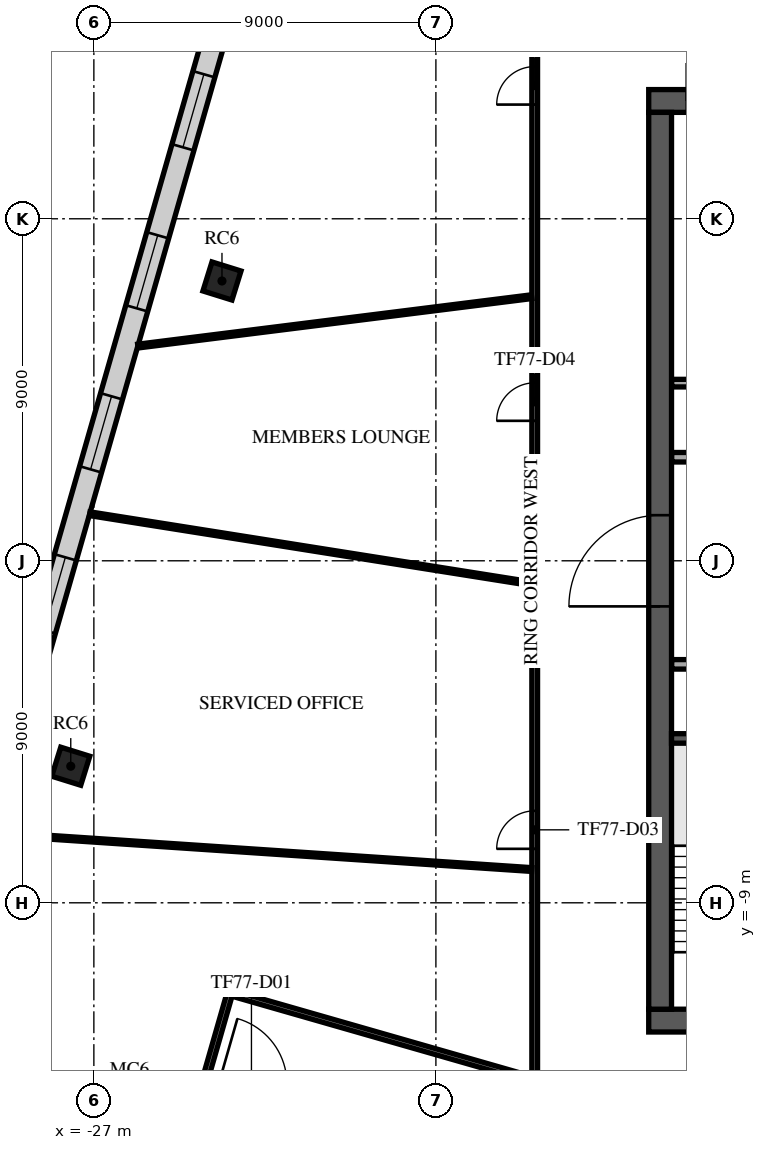
"""IFC4 building model, lengths in metres.
Left out: names, types, materials, properties, quantities, classifications, styles, units other than length and angle.
Written with IfcOpenShell. Run it as: python <this file> out.ifc"""

import sys

from ifc_helpers import new_model, si_unit, direction, frame, frame_2d, origin, origin_2d, place, context, subcontext, project, spatial, rectangle, extrude, element, fill, save


model = new_model("IFC4")
c1 = context("Model", 3, precision=1e-05, world=origin(), true_north=direction((0.0, 1.0)))
c2 = subcontext(c1, "Body", "Model", "MODEL_VIEW")
j1 = project(units=[si_unit("LENGTHUNIT", "METRE"), si_unit("PLANEANGLEUNIT", "RADIAN")], contexts=[c1])
p1 = place(None, origin())
s1 = spatial("IfcSite", under=j1, at=p1, CompositionType="ELEMENT")
p2 = place(p1, origin())
s2 = spatial("IfcBuilding", under=s1, at=p2, CompositionType="ELEMENT")
p3 = place(p2, frame((0.0, 0.0, 324.5)))
s3 = spatial("IfcBuildingStorey", under=s2, at=p3, CompositionType="ELEMENT", Elevation=324.5)
for number, where, z_axis, x_axis in (
    (1, (-23.629, 7.363, 0.0), (0.0, 0.0, 1.0), (0.298, 0.955, 0.0)),
    (2, (-27.608, -5.406, 0.0), (0.0, 0.0, 1.0), (0.298, 0.955, 0.0)),
):
    element("IfcColumn", number, at=place(p3, frame(where, z_axis=z_axis, x_axis=x_axis)), inside=s3, PredefinedType="COLUMN", context=c2, shape_type="SweptSolid", body=[
        extrude(rectangle(XDim=0.8, YDim=0.8, at=origin_2d()), origin(), (0.0, 0.0, 1.0), 4.0),
    ])
p4 = place(p3, frame((-12.4, 12.1, 0.0), z_axis=(0.0, 0.0, 1.0), x_axis=(1.0, 0.0, 0.0)))
e3 = element("IfcWall", 3, at=p4, inside=s3, PredefinedType="SHEAR", context=c2, shape_type="SweptSolid", body=[
    extrude(rectangle(XDim=24.8, YDim=0.6, at=frame_2d((12.4, 0.0))), origin(), (0.0, 0.0, 1.0), 3.65),
])
p5 = place(p4, frame((11.2, 0.0, 0.0)))
e4 = element("IfcOpeningElement", 4, at=p5, cuts=e3, PredefinedType="OPENING", context=c2, shape_type="SweptSolid", body=[
    extrude(rectangle(XDim=2.4, YDim=2.4, at=frame_2d((1.2, 1.2))), frame((0.0, 0.31, 0.0), z_axis=(0.0, -1.0, 0.0), x_axis=(1.0, 0.0, 0.0)), (0.0, 0.0, 1.0), 0.62),
])
p6 = place(p4, frame((22.025, 0.0, 0.0)))
e5 = element("IfcOpeningElement", 5, at=p6, cuts=e3, PredefinedType="OPENING", context=c2, shape_type="SweptSolid", body=[
    extrude(rectangle(XDim=1.2, YDim=2.1, at=frame_2d((0.6, 1.05))), frame((0.0, 0.31, 0.0), z_axis=(0.0, -1.0, 0.0), x_axis=(1.0, 0.0, 0.0)), (0.0, 0.0, 1.0), 0.62),
])
p7 = place(p4, frame((1.0, 0.0, 0.0)))
e6 = element("IfcOpeningElement", 6, at=p7, cuts=e3, PredefinedType="OPENING", context=c2, shape_type="SweptSolid", body=[
    extrude(rectangle(XDim=1.0, YDim=2.1, at=frame_2d((0.5, 1.05))), frame((0.0, 0.31, 0.0), z_axis=(0.0, -1.0, 0.0), x_axis=(1.0, 0.0, 0.0)), (0.0, 0.0, 1.0), 0.62),
])
p8 = place(p3, frame((-12.4, -12.1, 0.0), z_axis=(0.0, 0.0, 1.0), x_axis=(1.0, 0.0, 0.0)))
e7 = element("IfcWall", 7, at=p8, inside=s3, PredefinedType="SHEAR", context=c2, shape_type="SweptSolid", body=[
    extrude(rectangle(XDim=24.8, YDim=0.6, at=frame_2d((12.4, 0.0))), origin(), (0.0, 0.0, 1.0), 3.65),
])
p9 = place(p8, frame((7.3, 0.0, 0.0)))
e8 = element("IfcOpeningElement", 8, at=p9, cuts=e7, PredefinedType="OPENING", context=c2, shape_type="SweptSolid", body=[
    extrude(rectangle(XDim=2.0, YDim=2.1, at=frame_2d((1.0, 1.05))), frame((0.0, 0.31, 0.0), z_axis=(0.0, -1.0, 0.0), x_axis=(1.0, 0.0, 0.0)), (0.0, 0.0, 1.0), 0.62),
])
p10 = place(p8, frame((17.425, 0.0, 0.0)))
e9 = element("IfcOpeningElement", 9, at=p10, cuts=e7, PredefinedType="OPENING", context=c2, shape_type="SweptSolid", body=[
    extrude(rectangle(XDim=1.2, YDim=2.1, at=frame_2d((0.6, 1.05))), frame((0.0, 0.31, 0.0), z_axis=(0.0, -1.0, 0.0), x_axis=(1.0, 0.0, 0.0)), (0.0, 0.0, 1.0), 0.62),
])
p11 = place(p8, frame((1.575, 0.0, 0.0)))
e10 = element("IfcOpeningElement", 10, at=p11, cuts=e7, PredefinedType="OPENING", context=c2, shape_type="SweptSolid", body=[
    extrude(rectangle(XDim=1.2, YDim=2.1, at=frame_2d((0.6, 1.05))), frame((0.0, 0.31, 0.0), z_axis=(0.0, -1.0, 0.0), x_axis=(1.0, 0.0, 0.0)), (0.0, 0.0, 1.0), 0.62),
])
p12 = place(p8, frame((22.025, 0.0, 0.0)))
e11 = element("IfcOpeningElement", 11, at=p12, cuts=e7, PredefinedType="OPENING", context=c2, shape_type="SweptSolid", body=[
    extrude(rectangle(XDim=1.2, YDim=2.1, at=frame_2d((0.6, 1.05))), frame((0.0, 0.31, 0.0), z_axis=(0.0, -1.0, 0.0), x_axis=(1.0, 0.0, 0.0)), (0.0, 0.0, 1.0), 0.62),
])
p13 = place(p3, frame((-12.1, -11.8, 0.0), z_axis=(0.0, 0.0, 1.0), x_axis=(0.0, 1.0, 0.0)))
e12 = element("IfcWall", 12, at=p13, inside=s3, PredefinedType="SHEAR", context=c2, shape_type="SweptSolid", body=[
    extrude(rectangle(XDim=23.6, YDim=0.6, at=frame_2d((11.8, 0.0))), origin(), (0.0, 0.0, 1.0), 3.65),
])
p14 = place(p13, frame((10.6, 0.0, 0.0)))
e13 = element("IfcOpeningElement", 13, at=p14, cuts=e12, PredefinedType="OPENING", context=c2, shape_type="SweptSolid", body=[
    extrude(rectangle(XDim=2.4, YDim=2.4, at=frame_2d((1.2, 1.2))), frame((0.0, 0.31, 0.0), z_axis=(0.0, -1.0, 0.0), x_axis=(1.0, 0.0, 0.0)), (0.0, 0.0, 1.0), 0.62),
])
p15 = place(p3, frame((-8.65, -4.675, 0.0), z_axis=(0.0, 0.0, 1.0), x_axis=(-1.0, 0.0, 0.0)))
e14 = element("IfcWall", 14, at=p15, inside=s3, PredefinedType="SOLIDWALL", context=c2, shape_type="SweptSolid", body=[
    extrude(rectangle(XDim=3.15, YDim=0.25, at=frame_2d((1.575, 0.0))), origin(), (0.0, 0.0, 1.0), 3.65),
])
p16 = place(p3, frame((-11.795, -2.725, 0.0), z_axis=(0.0, 0.0, 1.0), x_axis=(1.0, 0.0, 0.0)))
e15 = element("IfcWall", 15, at=p16, inside=s3, PredefinedType="PARTITIONING", context=c2, shape_type="SweptSolid", body=[
    extrude(rectangle(XDim=14.415, YDim=0.25, at=frame_2d((7.208, 0.0))), origin(), (0.0, 0.0, 1.0), 3.65),
])
p17 = place(p16, frame((1.295, 0.0, 0.0)))
e16 = element("IfcOpeningElement", 16, at=p17, cuts=e15, PredefinedType="OPENING", context=c2, shape_type="SweptSolid", body=[
    extrude(rectangle(XDim=1.0, YDim=2.1, at=frame_2d((0.5, 1.05))), frame((0.0, 0.135, 0.0), z_axis=(0.0, -1.0, 0.0), x_axis=(1.0, 0.0, 0.0)), (0.0, 0.0, 1.0), 0.27),
])
p18 = place(p16, frame((4.42, 0.0, 0.0)))
e17 = element("IfcOpeningElement", 17, at=p18, cuts=e15, PredefinedType="OPENING", context=c2, shape_type="SweptSolid", body=[
    extrude(rectangle(XDim=1.0, YDim=2.1, at=frame_2d((0.5, 1.05))), frame((0.0, 0.135, 0.0), z_axis=(0.0, -1.0, 0.0), x_axis=(1.0, 0.0, 0.0)), (0.0, 0.0, 1.0), 0.27),
])
p19 = place(p16, frame((9.92, 0.0, 0.0)))
e18 = element("IfcOpeningElement", 18, at=p19, cuts=e15, PredefinedType="OPENING", context=c2, shape_type="SweptSolid", body=[
    extrude(rectangle(XDim=1.0, YDim=2.1, at=frame_2d((0.5, 1.05))), frame((0.0, 0.135, 0.0), z_axis=(0.0, -1.0, 0.0), x_axis=(1.0, 0.0, 0.0)), (0.0, 0.0, 1.0), 0.27),
])
p20 = place(p3, frame((-11.795, 2.725, 0.0), z_axis=(0.0, 0.0, 1.0), x_axis=(1.0, 0.0, 0.0)))
e19 = element("IfcWall", 19, at=p20, inside=s3, PredefinedType="PARTITIONING", context=c2, shape_type="SweptSolid", body=[
    extrude(rectangle(XDim=23.59, YDim=0.25, at=frame_2d((11.795, 0.0))), origin(), (0.0, 0.0, 1.0), 3.65),
])
p21 = place(p20, frame((21.345, 0.0, 0.0)))
e20 = element("IfcOpeningElement", 20, at=p21, cuts=e19, PredefinedType="OPENING", context=c2, shape_type="SweptSolid", body=[
    extrude(rectangle(XDim=0.9, YDim=2.1, at=frame_2d((0.45, 1.05))), frame((0.0, 0.135, 0.0), z_axis=(0.0, -1.0, 0.0), x_axis=(1.0, 0.0, 0.0)), (0.0, 0.0, 1.0), 0.27),
])
p22 = place(p20, frame((1.345, 0.0, 0.0)))
e21 = element("IfcOpeningElement", 21, at=p22, cuts=e19, PredefinedType="OPENING", context=c2, shape_type="SweptSolid", body=[
    extrude(rectangle(XDim=0.9, YDim=2.1, at=frame_2d((0.45, 1.05))), frame((0.0, 0.135, 0.0), z_axis=(0.0, -1.0, 0.0), x_axis=(1.0, 0.0, 0.0)), (0.0, 0.0, 1.0), 0.27),
])
p23 = place(p20, frame((4.32, 0.0, 0.0)))
e22 = element("IfcOpeningElement", 22, at=p23, cuts=e19, PredefinedType="OPENING", context=c2, shape_type="SweptSolid", body=[
    extrude(rectangle(XDim=1.2, YDim=2.1, at=frame_2d((0.6, 1.05))), frame((0.0, 0.135, 0.0), z_axis=(0.0, -1.0, 0.0), x_axis=(1.0, 0.0, 0.0)), (0.0, 0.0, 1.0), 0.27),
])
p24 = place(p20, frame((12.57, 0.0, 0.0)))
e23 = element("IfcOpeningElement", 23, at=p24, cuts=e19, PredefinedType="OPENING", context=c2, shape_type="SweptSolid", body=[
    extrude(rectangle(XDim=1.2, YDim=2.1, at=frame_2d((0.6, 1.05))), frame((0.0, 0.135, 0.0), z_axis=(0.0, -1.0, 0.0), x_axis=(1.0, 0.0, 0.0)), (0.0, 0.0, 1.0), 0.27),
])
p25 = place(p3, frame((-11.795, 4.675, 0.0), z_axis=(0.0, 0.0, 1.0), x_axis=(1.0, 0.0, 0.0)))
e24 = element("IfcWall", 24, at=p25, inside=s3, PredefinedType="PARTITIONING", context=c2, shape_type="SweptSolid", body=[
    extrude(rectangle(XDim=3.645, YDim=0.2, at=frame_2d((1.823, 0.0))), origin(), (0.0, 0.0, 1.0), 3.65),
])
p26 = place(p3, frame((-18.913, 30.91, 0.0), z_axis=(0.0, 0.0, 1.0), x_axis=(-0.275636693765, -0.961261885778, 0.0)))
e25 = element("IfcWall", 25, at=p26, inside=s3, PredefinedType="STANDARD", context=c2, shape_type="SweptSolid", body=[
    extrude(rectangle(XDim=48.49, YDim=0.6, at=frame_2d((24.245, 0.0))), origin(), (0.0, 0.0, 1.0), 3.65),
])
p27 = place(p26, frame((1.204, 0.0, 0.9)))
e26 = element("IfcOpeningElement", 26, at=p27, cuts=e25, PredefinedType="OPENING", context=c2, shape_type="SweptSolid", body=[
    extrude(rectangle(XDim=2.0, YDim=2.1, at=frame_2d((1.0, 1.05))), frame((0.0, 0.31, 0.0), z_axis=(0.0, -1.0, 0.0), x_axis=(1.0, 0.0, 0.0)), (0.0, 0.0, 1.0), 0.62),
])
p28 = place(p26, frame((5.612, 0.0, 0.9)))
e27 = element("IfcOpeningElement", 27, at=p28, cuts=e25, PredefinedType="OPENING", context=c2, shape_type="SweptSolid", body=[
    extrude(rectangle(XDim=2.0, YDim=2.1, at=frame_2d((1.0, 1.05))), frame((0.0, 0.31, 0.0), z_axis=(0.0, -1.0, 0.0), x_axis=(1.0, 0.0, 0.0)), (0.0, 0.0, 1.0), 0.62),
])
p29 = place(p26, frame((10.021, 0.0, 0.9)))
e28 = element("IfcOpeningElement", 28, at=p29, cuts=e25, PredefinedType="OPENING", context=c2, shape_type="SweptSolid", body=[
    extrude(rectangle(XDim=2.0, YDim=2.1, at=frame_2d((1.0, 1.05))), frame((0.0, 0.31, 0.0), z_axis=(0.0, -1.0, 0.0), x_axis=(1.0, 0.0, 0.0)), (0.0, 0.0, 1.0), 0.62),
])
p30 = place(p26, frame((14.428, 0.0, 0.9)))
e29 = element("IfcOpeningElement", 29, at=p30, cuts=e25, PredefinedType="OPENING", context=c2, shape_type="SweptSolid", body=[
    extrude(rectangle(XDim=2.0, YDim=2.1, at=frame_2d((1.0, 1.05))), frame((0.0, 0.31, 0.0), z_axis=(0.0, -1.0, 0.0), x_axis=(1.0, 0.0, 0.0)), (0.0, 0.0, 1.0), 0.62),
])
p31 = place(p26, frame((18.837, 0.0, 0.9)))
e30 = element("IfcOpeningElement", 30, at=p31, cuts=e25, PredefinedType="OPENING", context=c2, shape_type="SweptSolid", body=[
    extrude(rectangle(XDim=2.0, YDim=2.1, at=frame_2d((1.0, 1.05))), frame((0.0, 0.31, 0.0), z_axis=(0.0, -1.0, 0.0), x_axis=(1.0, 0.0, 0.0)), (0.0, 0.0, 1.0), 0.62),
])
p32 = place(p26, frame((23.245, 0.0, 0.9)))
e31 = element("IfcOpeningElement", 31, at=p32, cuts=e25, PredefinedType="OPENING", context=c2, shape_type="SweptSolid", body=[
    extrude(rectangle(XDim=2.0, YDim=2.1, at=frame_2d((1.0, 1.05))), frame((0.0, 0.31, 0.0), z_axis=(0.0, -1.0, 0.0), x_axis=(1.0, 0.0, 0.0)), (0.0, 0.0, 1.0), 0.62),
])
p33 = place(p26, frame((27.653, 0.0, 0.9)))
e32 = element("IfcOpeningElement", 32, at=p33, cuts=e25, PredefinedType="OPENING", context=c2, shape_type="SweptSolid", body=[
    extrude(rectangle(XDim=2.0, YDim=2.1, at=frame_2d((1.0, 1.05))), frame((0.0, 0.31, 0.0), z_axis=(0.0, -1.0, 0.0), x_axis=(1.0, 0.0, 0.0)), (0.0, 0.0, 1.0), 0.62),
])
p34 = place(p26, frame((32.061, 0.0, 0.9)))
e33 = element("IfcOpeningElement", 33, at=p34, cuts=e25, PredefinedType="OPENING", context=c2, shape_type="SweptSolid", body=[
    extrude(rectangle(XDim=2.0, YDim=2.1, at=frame_2d((1.0, 1.05))), frame((0.0, 0.31, 0.0), z_axis=(0.0, -1.0, 0.0), x_axis=(1.0, 0.0, 0.0)), (0.0, 0.0, 1.0), 0.62),
])
p35 = place(p26, frame((36.469, 0.0, 0.9)))
e34 = element("IfcOpeningElement", 34, at=p35, cuts=e25, PredefinedType="OPENING", context=c2, shape_type="SweptSolid", body=[
    extrude(rectangle(XDim=2.0, YDim=2.1, at=frame_2d((1.0, 1.05))), frame((0.0, 0.31, 0.0), z_axis=(0.0, -1.0, 0.0), x_axis=(1.0, 0.0, 0.0)), (0.0, 0.0, 1.0), 0.62),
])
p36 = place(p26, frame((40.877, 0.0, 0.9)))
e35 = element("IfcOpeningElement", 35, at=p36, cuts=e25, PredefinedType="OPENING", context=c2, shape_type="SweptSolid", body=[
    extrude(rectangle(XDim=2.0, YDim=2.1, at=frame_2d((1.0, 1.05))), frame((0.0, 0.31, 0.0), z_axis=(0.0, -1.0, 0.0), x_axis=(1.0, 0.0, 0.0)), (0.0, 0.0, 1.0), 0.62),
])
p37 = place(p26, frame((45.285, 0.0, 0.9)))
e36 = element("IfcOpeningElement", 36, at=p37, cuts=e25, PredefinedType="OPENING", context=c2, shape_type="SweptSolid", body=[
    extrude(rectangle(XDim=2.0, YDim=2.1, at=frame_2d((1.0, 1.05))), frame((0.0, 0.31, 0.0), z_axis=(0.0, -1.0, 0.0), x_axis=(1.0, 0.0, 0.0)), (0.0, 0.0, 1.0), 0.62),
])
p38 = place(p3, frame((-28.556, -13.395, 0.0), z_axis=(0.0, 0.0, 1.0), x_axis=(0.48481597855, -0.874616182644, 0.0)))
e37 = element("IfcWall", 37, at=p38, inside=s3, PredefinedType="STANDARD", context=c2, shape_type="SweptSolid", body=[
    extrude(rectangle(XDim=8.5, YDim=0.6, at=frame_2d((4.25, 0.0))), origin(), (0.0, 0.0, 1.0), 3.65),
])
p39 = place(p38, frame((5.475, 0.0, 0.9)))
e38 = element("IfcOpeningElement", 38, at=p39, cuts=e37, PredefinedType="OPENING", context=c2, shape_type="SweptSolid", body=[
    extrude(rectangle(XDim=1.8, YDim=2.1, at=frame_2d((0.9, 1.05))), frame((0.0, 0.31, 0.0), z_axis=(0.0, -1.0, 0.0), x_axis=(1.0, 0.0, 0.0)), (0.0, 0.0, 1.0), 0.62),
])
p40 = place(p3, frame((-24.079, -13.673, 0.0), z_axis=(0.0, 0.0, 1.0), x_axis=(0.275849392554, 0.961200870072, 0.0)))
e39 = element("IfcWall", 39, at=p40, inside=s3, PredefinedType="PARTITIONING", context=c2, shape_type="SweptSolid", body=[
    extrude(rectangle(XDim=2.4, YDim=0.15, at=frame_2d((1.2, 0.0))), origin(), (0.0, 0.0, 1.0), 3.65),
])
p41 = place(p3, frame((-23.345, -11.387, 0.0), z_axis=(0.0, 0.0, 1.0), x_axis=(0.961258213807, -0.275649499163, 0.0)))
e40 = element("IfcWall", 40, at=p41, inside=s3, PredefinedType="PARTITIONING", context=c2, shape_type="SweptSolid", body=[
    extrude(rectangle(XDim=8.265, YDim=0.15, at=frame_2d((4.133, 0.0))), origin(), (0.0, 0.0, 1.0), 3.25),
])
p42 = place(p3, frame((-15.4, -13.565, 0.0), z_axis=(0.0, 0.0, 1.0), x_axis=(0.0, 1.0, 0.0)))
e41 = element("IfcWall", 41, at=p42, inside=s3, PredefinedType="PARTITIONING", context=c2, shape_type="SweptSolid", body=[
    extrude(rectangle(XDim=28.965, YDim=0.15, at=frame_2d((14.483, 0.0))), origin(), (0.0, 0.0, 1.0), 3.25),
])
p43 = place(p42, frame((5.986, 0.0, 0.0)))
e42 = element("IfcOpeningElement", 42, at=p43, cuts=e41, PredefinedType="OPENING", context=c2, shape_type="SweptSolid", body=[
    extrude(rectangle(XDim=1.0, YDim=2.1, at=frame_2d((0.5, 1.05))), frame((0.0, 0.085, 0.0), z_axis=(0.0, -1.0, 0.0), x_axis=(1.0, 0.0, 0.0)), (0.0, 0.0, 1.0), 0.17),
])
p44 = place(p42, frame((17.249, 0.0, 0.0)))
e43 = element("IfcOpeningElement", 43, at=p44, cuts=e41, PredefinedType="OPENING", context=c2, shape_type="SweptSolid", body=[
    extrude(rectangle(XDim=1.0, YDim=2.1, at=frame_2d((0.5, 1.05))), frame((0.0, 0.085, 0.0), z_axis=(0.0, -1.0, 0.0), x_axis=(1.0, 0.0, 0.0)), (0.0, 0.0, 1.0), 0.17),
])
p45 = place(p42, frame((25.571, 0.0, 0.0)))
e44 = element("IfcOpeningElement", 44, at=p45, cuts=e41, PredefinedType="OPENING", context=c2, shape_type="SweptSolid", body=[
    extrude(rectangle(XDim=1.0, YDim=2.1, at=frame_2d((0.5, 1.05))), frame((0.0, 0.085, 0.0), z_axis=(0.0, -1.0, 0.0), x_axis=(1.0, 0.0, 0.0)), (0.0, 0.0, 1.0), 0.17),
])
p46 = place(p3, frame((-29.522, -7.184, 0.0), z_axis=(0.0, 0.0, 1.0), x_axis=(0.997764155263, -0.06683330361, 0.0)))
e45 = element("IfcWall", 45, at=p46, inside=s3, PredefinedType="PARTITIONING", context=c2, shape_type="SweptSolid", body=[
    extrude(rectangle(XDim=14.075, YDim=0.1, at=frame_2d((7.038, 0.0))), origin(), (0.0, 0.0, 1.0), 3.05),
])
p47 = place(p3, frame((-27.107, 1.238, 0.0), z_axis=(0.0, 0.0, 1.0), x_axis=(0.987675008346, -0.156518618344, 0.0)))
e46 = element("IfcWall", 46, at=p47, inside=s3, PredefinedType="PARTITIONING", context=c2, shape_type="SweptSolid", body=[
    extrude(rectangle(XDim=11.769, YDim=0.1, at=frame_2d((5.884, 0.0))), origin(), (0.0, 0.0, 1.0), 3.05),
])
p48 = place(p3, frame((-25.842, 5.65, 0.0), z_axis=(0.0, 0.0, 1.0), x_axis=(0.992219133517, 0.12450377939, 0.0)))
e47 = element("IfcWall", 47, at=p48, inside=s3, PredefinedType="PARTITIONING", context=c2, shape_type="SweptSolid", body=[
    extrude(rectangle(XDim=10.442, YDim=0.1, at=frame_2d((5.221, 0.0))), origin(), (0.0, 0.0, 1.0), 3.05),
])
p49 = place(p14, origin())
e48 = element("IfcDoor", 48, at=p49, inside=s3, OperationType="SINGLE_SWING_LEFT", PredefinedType="DOOR", context=c2, shape_type="SweptSolid", body=[
    extrude(rectangle(XDim=2.4, YDim=2.4, at=frame_2d((1.2, 1.2))), frame((0.0, 0.025, 0.0), z_axis=(0.0, -1.0, 0.0), x_axis=(1.0, 0.0, 0.0)), (0.0, 0.0, 1.0), 0.05),
])
fill(e13, e48)
p50 = place(p31, origin())
e49 = element("IfcWindow", 49, at=p50, inside=s3, PartitioningType="SINGLE_PANEL", PredefinedType="WINDOW", context=c2, shape_type="SweptSolid", body=[
    extrude(rectangle(XDim=2.0, YDim=2.1, at=frame_2d((1.0, 1.05))), frame((0.0, 0.03, 0.0), z_axis=(0.0, -1.0, 0.0), x_axis=(1.0, 0.0, 0.0)), (0.0, 0.0, 1.0), 0.06),
])
fill(e30, e49)
p51 = place(p32, origin())
e50 = element("IfcWindow", 50, at=p51, inside=s3, PartitioningType="SINGLE_PANEL", PredefinedType="WINDOW", context=c2, shape_type="SweptSolid", body=[
    extrude(rectangle(XDim=2.0, YDim=2.1, at=frame_2d((1.0, 1.05))), frame((0.0, 0.03, 0.0), z_axis=(0.0, -1.0, 0.0), x_axis=(1.0, 0.0, 0.0)), (0.0, 0.0, 1.0), 0.06),
])
fill(e31, e50)
p52 = place(p33, origin())
e51 = element("IfcWindow", 51, at=p52, inside=s3, PartitioningType="SINGLE_PANEL", PredefinedType="WINDOW", context=c2, shape_type="SweptSolid", body=[
    extrude(rectangle(XDim=2.0, YDim=2.1, at=frame_2d((1.0, 1.05))), frame((0.0, 0.03, 0.0), z_axis=(0.0, -1.0, 0.0), x_axis=(1.0, 0.0, 0.0)), (0.0, 0.0, 1.0), 0.06),
])
fill(e32, e51)
p53 = place(p34, origin())
e52 = element("IfcWindow", 52, at=p53, inside=s3, PartitioningType="SINGLE_PANEL", PredefinedType="WINDOW", context=c2, shape_type="SweptSolid", body=[
    extrude(rectangle(XDim=2.0, YDim=2.1, at=frame_2d((1.0, 1.05))), frame((0.0, 0.03, 0.0), z_axis=(0.0, -1.0, 0.0), x_axis=(1.0, 0.0, 0.0)), (0.0, 0.0, 1.0), 0.06),
])
fill(e33, e52)
p54 = place(p43, origin())
e53 = element("IfcDoor", 53, at=p54, inside=s3, OperationType="SINGLE_SWING_RIGHT", PredefinedType="DOOR", context=c2, shape_type="SweptSolid", body=[
    extrude(rectangle(XDim=1.0, YDim=2.1, at=frame_2d((0.5, 1.05))), frame((0.0, 0.025, 0.0), z_axis=(0.0, -1.0, 0.0), x_axis=(1.0, 0.0, 0.0)), (0.0, 0.0, 1.0), 0.05),
])
fill(e42, e53)
p55 = place(p44, origin())
e54 = element("IfcDoor", 54, at=p55, inside=s3, OperationType="SINGLE_SWING_LEFT", PredefinedType="DOOR", context=c2, shape_type="SweptSolid", body=[
    extrude(rectangle(XDim=1.0, YDim=2.1, at=frame_2d((0.5, 1.05))), frame((0.0, 0.025, 0.0), z_axis=(0.0, -1.0, 0.0), x_axis=(1.0, 0.0, 0.0)), (0.0, 0.0, 1.0), 0.05),
])
fill(e43, e54)
p56 = place(p45, origin())
e55 = element("IfcDoor", 55, at=p56, inside=s3, OperationType="SINGLE_SWING_LEFT", PredefinedType="DOOR", context=c2, shape_type="SweptSolid", body=[
    extrude(rectangle(XDim=1.0, YDim=2.1, at=frame_2d((0.5, 1.05))), frame((0.0, 0.025, 0.0), z_axis=(0.0, -1.0, 0.0), x_axis=(1.0, 0.0, 0.0)), (0.0, 0.0, 1.0), 0.05),
])
fill(e44, e55)
save(model, sys.argv[1])
